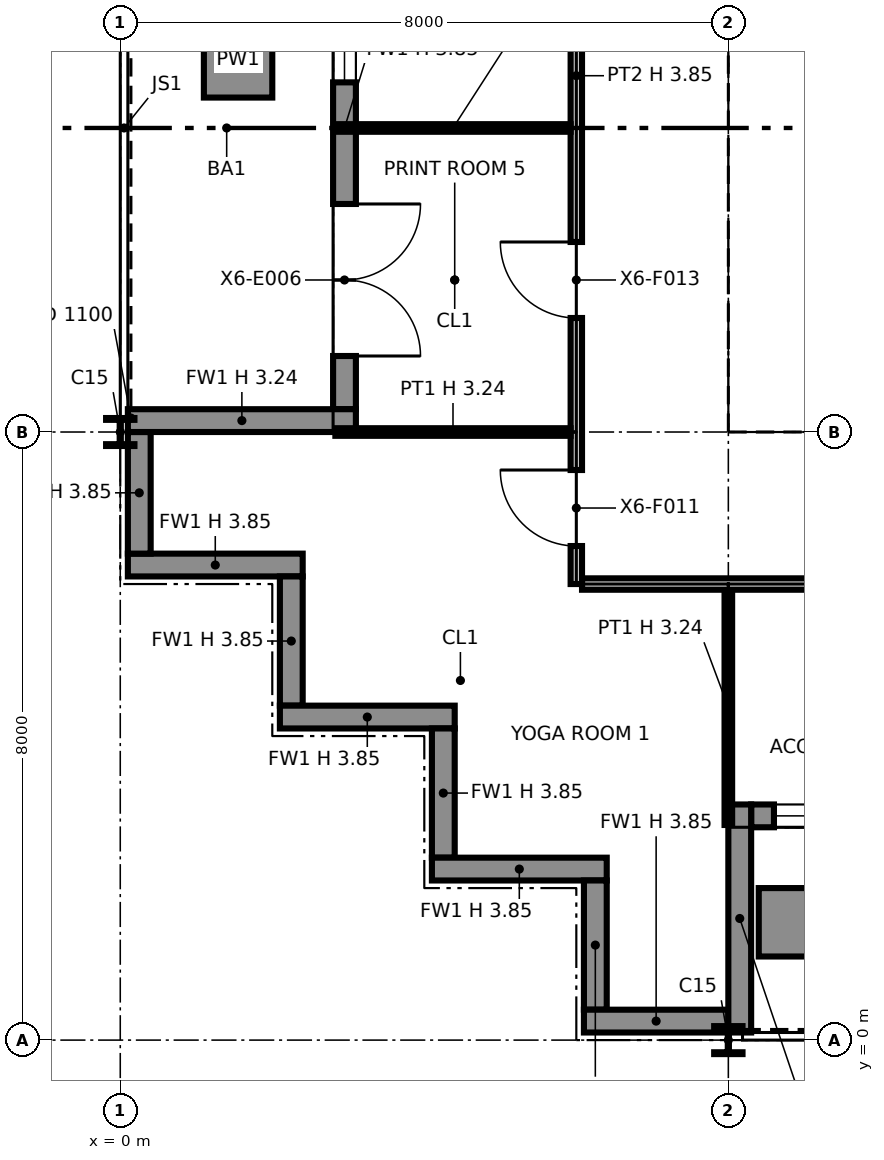
"""IFC4 building model, lengths in metres.
Left out: names, types, materials, properties, quantities, classifications, styles, units other than length and angle.
Written with IfcOpenShell. Run it as: python <this file> out.ifc"""

import sys

from ifc_helpers import new_model, si_unit, direction, frame, frame_2d, origin, origin_2d, place, context, subcontext, project, spatial, polyline, rectangle, i_section, outline, extrude, element, fill, save


model = new_model("IFC4")
c1 = context("Model", 3, precision=1e-05, world=origin(), true_north=direction((0.0, 1.0)))
c2 = subcontext(c1, "Body", "Model", "MODEL_VIEW")
j1 = project(units=[si_unit("LENGTHUNIT", "METRE"), si_unit("PLANEANGLEUNIT", "RADIAN")], contexts=[c1])
p1 = place(None, origin())
s1 = spatial("IfcSite", under=j1, at=p1, CompositionType="ELEMENT")
p2 = place(p1, origin())
s2 = spatial("IfcBuilding", under=s1, at=p2, CompositionType="ELEMENT")
p3 = place(p2, frame((0.0, 0.0, 291.0)))
s3 = spatial("IfcBuildingStorey", under=s2, at=p3, CompositionType="ELEMENT", Elevation=291.0)
for number, where, z_axis, x_axis in (
    (1, (0.0, 8.0, 0.0), (0.0, 0.0, 1.0), (1.0, 0.0, 0.0)),
    (2, (8.0, 0.0, 0.0), (0.0, 0.0, 1.0), (1.0, 0.0, 0.0)),
):
    element("IfcColumn", number, at=place(p3, frame(where, z_axis=z_axis, x_axis=x_axis)), inside=s3, PredefinedType="COLUMN", context=c2, shape_type="SweptSolid", body=[
        extrude(i_section(OverallWidth=0.373, OverallDepth=0.368, WebThickness=0.015, FlangeThickness=0.024, at=origin_2d()), origin(), (0.0, 0.0, 1.0), 3.85),
    ])
p4 = place(p3, frame((8.0, 8.0, 0.0), z_axis=(0.0, 0.0, 1.0), x_axis=(1.0, 0.0, 0.0)))
e3 = element("IfcColumn", 3, at=p4, inside=s3, PredefinedType="COLUMN", context=c2, shape_type="SweptSolid", body=[
    extrude(i_section(OverallWidth=0.257, OverallDepth=0.363, WebThickness=0.013, FlangeThickness=0.022, at=origin_2d()), origin(), (0.0, 0.0, 1.0), 3.85),
])
p5 = place(p3, frame((0.1, 6.25, 0.0), z_axis=(0.0, 0.0, 1.0), x_axis=(1.0, 0.0, 0.0)))
e4 = element("IfcWall", 4, at=p5, inside=s3, PredefinedType="SOLIDWALL", context=c2, shape_type="SweptSolid", body=[
    extrude(rectangle(XDim=2.3, YDim=0.3, at=frame_2d((1.15, 0.0))), origin(), (0.0, 0.0, 1.0), 3.85),
])
p6 = place(p3, frame((2.25, 6.1, 0.0), z_axis=(0.0, 0.0, 1.0), x_axis=(0.0, -1.0, 0.0)))
e5 = element("IfcWall", 5, at=p6, inside=s3, PredefinedType="SOLIDWALL", context=c2, shape_type="SweptSolid", body=[
    extrude(rectangle(XDim=1.7, YDim=0.3, at=frame_2d((0.85, 0.0))), origin(), (0.0, 0.0, 1.0), 3.85),
])
p7 = place(p3, frame((2.1, 4.25, 0.0), z_axis=(0.0, 0.0, 1.0), x_axis=(1.0, 0.0, 0.0)))
e6 = element("IfcWall", 6, at=p7, inside=s3, PredefinedType="SOLIDWALL", context=c2, shape_type="SweptSolid", body=[
    extrude(rectangle(XDim=2.3, YDim=0.3, at=frame_2d((1.15, 0.0))), origin(), (0.0, 0.0, 1.0), 3.85),
])
p8 = place(p3, frame((4.25, 4.1, 0.0), z_axis=(0.0, 0.0, 1.0), x_axis=(0.0, -1.0, 0.0)))
e7 = element("IfcWall", 7, at=p8, inside=s3, PredefinedType="SOLIDWALL", context=c2, shape_type="SweptSolid", body=[
    extrude(rectangle(XDim=1.7, YDim=0.3, at=frame_2d((0.85, 0.0))), origin(), (0.0, 0.0, 1.0), 3.85),
])
p9 = place(p3, frame((4.1, 2.25, 0.0), z_axis=(0.0, 0.0, 1.0), x_axis=(1.0, 0.0, 0.0)))
e8 = element("IfcWall", 8, at=p9, inside=s3, PredefinedType="SOLIDWALL", context=c2, shape_type="SweptSolid", body=[
    extrude(rectangle(XDim=2.3, YDim=0.3, at=frame_2d((1.15, 0.0))), origin(), (0.0, 0.0, 1.0), 3.85),
])
p10 = place(p3, frame((6.25, 2.1, 0.0), z_axis=(0.0, 0.0, 1.0), x_axis=(0.0, -1.0, 0.0)))
e9 = element("IfcWall", 9, at=p10, inside=s3, PredefinedType="SOLIDWALL", context=c2, shape_type="SweptSolid", body=[
    extrude(rectangle(XDim=1.7, YDim=0.3, at=frame_2d((0.85, 0.0))), origin(), (0.0, 0.0, 1.0), 3.85),
])
p11 = place(p3, frame((6.1, 0.25, 0.0), z_axis=(0.0, 0.0, 1.0), x_axis=(1.0, 0.0, 0.0)))
e10 = element("IfcWall", 10, at=p11, inside=s3, PredefinedType="SOLIDWALL", context=c2, shape_type="SweptSolid", body=[
    extrude(rectangle(XDim=1.9, YDim=0.3, at=frame_2d((0.95, 0.0))), origin(), (0.0, 0.0, 1.0), 3.85),
])
p12 = place(p3, frame((8.3, 2.95, 0.0), z_axis=(0.0, 0.0, 1.0), x_axis=(1.0, 0.0, 0.0)))
e11 = element("IfcWall", 11, at=p12, inside=s3, PredefinedType="SOLIDWALL", context=c2, shape_type="SweptSolid", body=[
    extrude(rectangle(XDim=7.4, YDim=0.3, at=frame_2d((3.7, 0.0))), origin(), (0.0, 0.0, 1.0), 3.85),
])
p13 = place(p12, frame((0.3, 0.0, 0.9)))
e12 = element("IfcOpeningElement", 12, at=p13, cuts=e11, PredefinedType="OPENING", context=c2, shape_type="SweptSolid", body=[
    extrude(rectangle(XDim=2.8, YDim=2.2, at=frame_2d((1.4, 1.1))), frame((0.0, 0.16, 0.0), z_axis=(0.0, -1.0, 0.0), x_axis=(1.0, 0.0, 0.0)), (0.0, 0.0, 1.0), 0.32),
])
p14 = place(p12, frame((4.7, 0.0, 0.0)))
e13 = element("IfcOpeningElement", 13, at=p14, cuts=e11, PredefinedType="OPENING", context=c2, shape_type="SweptSolid", body=[
    extrude(rectangle(XDim=2.0, YDim=2.4, at=frame_2d((1.0, 1.2))), frame((0.0, 0.16, 0.0), z_axis=(0.0, -1.0, 0.0), x_axis=(1.0, 0.0, 0.0)), (0.0, 0.0, 1.0), 0.32),
])
p15 = place(p3, frame((8.15, 0.1, 0.0), z_axis=(0.0, 0.0, 1.0), x_axis=(0.0, 1.0, 0.0)))
e14 = element("IfcWall", 14, at=p15, inside=s3, PredefinedType="SOLIDWALL", context=c2, shape_type="SweptSolid", body=[
    extrude(rectangle(XDim=3.0, YDim=0.3, at=frame_2d((1.5, 0.0))), origin(), (0.0, 0.0, 1.0), 3.237),
])
p16 = place(p3, frame((8.4, 1.55, 0.0), z_axis=(0.0, 0.0, 1.0), x_axis=(1.0, 0.0, 0.0)))
e15 = element("IfcWall", 15, at=p16, inside=s3, PredefinedType="SOLIDWALL", context=c2, shape_type="SweptSolid", body=[
    extrude(rectangle(XDim=3.2, YDim=0.9, at=frame_2d((1.6, 0.0))), origin(), (0.0, 0.0, 1.0), 0.6),
])
p17 = place(p3, frame((2.95, 15.7, 0.0), z_axis=(0.0, 0.0, 1.0), x_axis=(0.0, -1.0, 0.0)))
e16 = element("IfcWall", 16, at=p17, inside=s3, PredefinedType="SOLIDWALL", context=c2, shape_type="SweptSolid", body=[
    extrude(rectangle(XDim=7.4, YDim=0.3, at=frame_2d((3.7, 0.0))), origin(), (0.0, 0.0, 1.0), 3.85),
])
p18 = place(p17, frame((0.3, 0.0, 0.9)))
e17 = element("IfcOpeningElement", 17, at=p18, cuts=e16, PredefinedType="OPENING", context=c2, shape_type="SweptSolid", body=[
    extrude(rectangle(XDim=2.8, YDim=2.2, at=frame_2d((1.4, 1.1))), frame((0.0, 0.16, 0.0), z_axis=(0.0, -1.0, 0.0), x_axis=(1.0, 0.0, 0.0)), (0.0, 0.0, 1.0), 0.32),
])
p19 = place(p17, frame((4.7, 0.0, 0.0)))
e18 = element("IfcOpeningElement", 18, at=p19, cuts=e16, PredefinedType="OPENING", context=c2, shape_type="SweptSolid", body=[
    extrude(rectangle(XDim=2.0, YDim=2.4, at=frame_2d((1.0, 1.2))), frame((0.0, 0.16, 0.0), z_axis=(0.0, -1.0, 0.0), x_axis=(1.0, 0.0, 0.0)), (0.0, 0.0, 1.0), 0.32),
])
p20 = place(p3, frame((0.1, 8.15, 0.0), z_axis=(0.0, 0.0, 1.0), x_axis=(1.0, 0.0, 0.0)))
e19 = element("IfcWall", 19, at=p20, inside=s3, PredefinedType="SOLIDWALL", context=c2, shape_type="SweptSolid", body=[
    extrude(rectangle(XDim=3.0, YDim=0.3, at=frame_2d((1.5, 0.0))), origin(), (0.0, 0.0, 1.0), 3.237),
])
p21 = place(p3, frame((0.25, 8.0, 0.0), z_axis=(0.0, 0.0, 1.0), x_axis=(0.0, -1.0, 0.0)))
e20 = element("IfcWall", 20, at=p21, inside=s3, PredefinedType="SOLIDWALL", context=c2, shape_type="SweptSolid", body=[
    extrude(rectangle(XDim=1.6, YDim=0.3, at=frame_2d((0.8, 0.0))), origin(), (0.0, 0.0, 1.0), 3.85),
])
p22 = place(p3, frame((1.55, 15.6, 0.0), z_axis=(0.0, 0.0, 1.0), x_axis=(0.0, -1.0, 0.0)))
e21 = element("IfcWall", 21, at=p22, inside=s3, PredefinedType="SOLIDWALL", context=c2, shape_type="SweptSolid", body=[
    extrude(rectangle(XDim=3.2, YDim=0.9, at=frame_2d((1.6, 0.0))), origin(), (0.0, 0.0, 1.0), 0.6),
])
p23 = place(p3, frame((8.65, 8.75, 0.0), z_axis=(0.0, 0.0, 1.0), x_axis=(1.0, 0.0, 0.0)))
e22 = element("IfcWall", 22, at=p23, inside=s3, PredefinedType="PARTITIONING", context=c2, shape_type="SweptSolid", body=[
    extrude(outline(polyline([(0.0, 0.0), (14.7, 0.0), (14.7, 3.85), (7.438, 3.85), (7.437, 3.318), (7.263, 3.318), (7.262, 3.85), (0.0, 3.85), (0.0, 0.0)])), frame((0.0, 0.1, 0.0), z_axis=(0.0, -1.0, 0.0), x_axis=(1.0, 0.0, 0.0)), (0.0, 0.0, 1.0), 0.2),
])
p24 = place(p23, frame((1.3, 0.0, 0.0)))
e23 = element("IfcOpeningElement", 23, at=p24, cuts=e22, PredefinedType="OPENING", context=c2, shape_type="SweptSolid", body=[
    extrude(rectangle(XDim=1.4, YDim=2.1, at=frame_2d((0.7, 1.05))), frame((0.0, 0.11, 0.0), z_axis=(0.0, -1.0, 0.0), x_axis=(1.0, 0.0, 0.0)), (0.0, 0.0, 1.0), 0.22),
])
p25 = place(p23, frame((4.6, 0.0, 0.0)))
e24 = element("IfcOpeningElement", 24, at=p25, cuts=e22, PredefinedType="OPENING", context=c2, shape_type="SweptSolid", body=[
    extrude(rectangle(XDim=1.4, YDim=2.1, at=frame_2d((0.7, 1.05))), frame((0.0, 0.11, 0.0), z_axis=(0.0, -1.0, 0.0), x_axis=(1.0, 0.0, 0.0)), (0.0, 0.0, 1.0), 0.22),
])
p26 = place(p23, frame((10.4, 0.0, 0.0)))
e25 = element("IfcOpeningElement", 25, at=p26, cuts=e22, PredefinedType="OPENING", context=c2, shape_type="SweptSolid", body=[
    extrude(rectangle(XDim=1.2, YDim=2.1, at=frame_2d((0.6, 1.05))), frame((0.0, 0.11, 0.0), z_axis=(0.0, -1.0, 0.0), x_axis=(1.0, 0.0, 0.0)), (0.0, 0.0, 1.0), 0.22),
])
p27 = place(p3, frame((8.75, 8.85, 0.0), z_axis=(0.0, 0.0, 1.0), x_axis=(0.0, 1.0, 0.0)))
e26 = element("IfcWall", 26, at=p27, inside=s3, PredefinedType="PARTITIONING", context=c2, shape_type="SweptSolid", body=[
    extrude(outline(polyline([(0.0, 0.0), (14.3, 0.0), (14.3, 3.85), (10.225, 3.85), (10.224, 3.44), (10.076, 3.44), (10.075, 3.85), (7.238, 3.85), (7.237, 3.318), (7.063, 3.318), (7.062, 3.85), (0.0, 3.85), (0.0, 0.0)])), frame((0.0, 0.1, 0.0), z_axis=(0.0, -1.0, 0.0), x_axis=(1.0, 0.0, 0.0)), (0.0, 0.0, 1.0), 0.2),
])
p28 = place(p27, frame((8.3, 0.0, 0.0)))
e27 = element("IfcOpeningElement", 27, at=p28, cuts=e26, PredefinedType="OPENING", context=c2, shape_type="SweptSolid", body=[
    extrude(rectangle(XDim=1.8, YDim=2.1, at=frame_2d((0.9, 1.05))), frame((0.0, 0.11, 0.0), z_axis=(0.0, -1.0, 0.0), x_axis=(1.0, 0.0, 0.0)), (0.0, 0.0, 1.0), 0.22),
])
p29 = place(p3, frame((8.0, 2.83, 0.0), z_axis=(0.0, 0.0, 1.0), x_axis=(0.0, 1.0, 0.0)))
e28 = element("IfcWall", 28, at=p29, inside=s3, PredefinedType="PARTITIONING", context=c2, shape_type="SweptSolid", body=[
    extrude(rectangle(XDim=3.095, YDim=0.1, at=frame_2d((1.547, 0.0))), origin(), (0.0, 0.0, 1.0), 3.238),
])
p30 = place(p3, frame((6.075, 6.0, 0.0), z_axis=(0.0, 0.0, 1.0), x_axis=(1.0, 0.0, 0.0)))
e29 = element("IfcWall", 29, at=p30, inside=s3, PredefinedType="PARTITIONING", context=c2, shape_type="SweptSolid", body=[
    extrude(rectangle(XDim=35.85, YDim=0.15, at=frame_2d((17.925, 0.0))), origin(), (0.0, 0.0, 1.0), 3.85),
])
p31 = place(p30, frame((12.425, 0.0, 0.0), z_axis=(0.0, 0.0, 1.0), x_axis=(-1.0, 0.0, 0.0)))
e30 = element("IfcOpeningElement", 30, at=p31, cuts=e29, PredefinedType="OPENING", context=c2, shape_type="SweptSolid", body=[
    extrude(rectangle(XDim=1.0, YDim=2.1, at=frame_2d((0.5, 1.05))), frame((0.0, 0.085, 0.0), z_axis=(0.0, -1.0, 0.0), x_axis=(1.0, 0.0, 0.0)), (0.0, 0.0, 1.0), 0.17),
])
p32 = place(p30, frame((16.425, 0.0, 0.0), z_axis=(0.0, 0.0, 1.0), x_axis=(-1.0, 0.0, 0.0)))
e31 = element("IfcOpeningElement", 31, at=p32, cuts=e29, PredefinedType="OPENING", context=c2, shape_type="SweptSolid", body=[
    extrude(rectangle(XDim=1.0, YDim=2.1, at=frame_2d((0.5, 1.05))), frame((0.0, 0.085, 0.0), z_axis=(0.0, -1.0, 0.0), x_axis=(1.0, 0.0, 0.0)), (0.0, 0.0, 1.0), 0.17),
])
p33 = place(p30, frame((30.425, 0.0, 0.0), z_axis=(0.0, 0.0, 1.0), x_axis=(-1.0, 0.0, 0.0)))
e32 = element("IfcOpeningElement", 32, at=p33, cuts=e29, PredefinedType="OPENING", context=c2, shape_type="SweptSolid", body=[
    extrude(rectangle(XDim=1.0, YDim=2.1, at=frame_2d((0.5, 1.05))), frame((0.0, 0.085, 0.0), z_axis=(0.0, -1.0, 0.0), x_axis=(1.0, 0.0, 0.0)), (0.0, 0.0, 1.0), 0.17),
])
p34 = place(p30, frame((4.425, 0.0, 0.0), z_axis=(0.0, 0.0, 1.0), x_axis=(-1.0, 0.0, 0.0)))
e33 = element("IfcOpeningElement", 33, at=p34, cuts=e29, PredefinedType="OPENING", context=c2, shape_type="SweptSolid", body=[
    extrude(rectangle(XDim=1.0, YDim=2.1, at=frame_2d((0.5, 1.05))), frame((0.0, 0.085, 0.0), z_axis=(0.0, -1.0, 0.0), x_axis=(1.0, 0.0, 0.0)), (0.0, 0.0, 1.0), 0.17),
])
p35 = place(p30, frame((8.425, 0.0, 0.0), z_axis=(0.0, 0.0, 1.0), x_axis=(-1.0, 0.0, 0.0)))
e34 = element("IfcOpeningElement", 34, at=p35, cuts=e29, PredefinedType="OPENING", context=c2, shape_type="SweptSolid", body=[
    extrude(rectangle(XDim=1.0, YDim=2.1, at=frame_2d((0.5, 1.05))), frame((0.0, 0.085, 0.0), z_axis=(0.0, -1.0, 0.0), x_axis=(1.0, 0.0, 0.0)), (0.0, 0.0, 1.0), 0.17),
])
p36 = place(p30, frame((19.425, 0.0, 0.0), z_axis=(0.0, 0.0, 1.0), x_axis=(-1.0, 0.0, 0.0)))
e35 = element("IfcOpeningElement", 35, at=p36, cuts=e29, PredefinedType="OPENING", context=c2, shape_type="SweptSolid", body=[
    extrude(rectangle(XDim=1.0, YDim=2.1, at=frame_2d((0.5, 1.05))), frame((0.0, 0.085, 0.0), z_axis=(0.0, -1.0, 0.0), x_axis=(1.0, 0.0, 0.0)), (0.0, 0.0, 1.0), 0.17),
])
p37 = place(p30, frame((24.425, 0.0, 0.0), z_axis=(0.0, 0.0, 1.0), x_axis=(-1.0, 0.0, 0.0)))
e36 = element("IfcOpeningElement", 36, at=p37, cuts=e29, PredefinedType="OPENING", context=c2, shape_type="SweptSolid", body=[
    extrude(rectangle(XDim=1.0, YDim=2.1, at=frame_2d((0.5, 1.05))), frame((0.0, 0.085, 0.0), z_axis=(0.0, -1.0, 0.0), x_axis=(1.0, 0.0, 0.0)), (0.0, 0.0, 1.0), 0.17),
])
p38 = place(p30, frame((35.425, 0.0, 0.0), z_axis=(0.0, 0.0, 1.0), x_axis=(-1.0, 0.0, 0.0)))
e37 = element("IfcOpeningElement", 37, at=p38, cuts=e29, PredefinedType="OPENING", context=c2, shape_type="SweptSolid", body=[
    extrude(rectangle(XDim=1.0, YDim=2.1, at=frame_2d((0.5, 1.05))), frame((0.0, 0.085, 0.0), z_axis=(0.0, -1.0, 0.0), x_axis=(1.0, 0.0, 0.0)), (0.0, 0.0, 1.0), 0.17),
])
p39 = place(p3, frame((6.0, 6.0, 0.0), z_axis=(0.0, 0.0, 1.0), x_axis=(0.0, 1.0, 0.0)))
e38 = element("IfcWall", 38, at=p39, inside=s3, PredefinedType="PARTITIONING", context=c2, shape_type="SweptSolid", body=[
    extrude(outline(polyline([(0.0, 0.0), (13.375, 0.0), (13.375, 3.85), (10.3, 3.85), (10.298, 3.238), (9.702, 3.238), (9.7, 3.85), (6.3, 3.85), (6.298, 3.238), (5.702, 3.238), (5.7, 3.85), (2.3, 3.85), (2.298, 3.238), (1.702, 3.238), (1.7, 3.85), (0.0, 3.85), (0.0, 0.0)])), frame((0.0, 0.075, 0.0), z_axis=(0.0, -1.0, 0.0), x_axis=(1.0, 0.0, 0.0)), (0.0, 0.0, 1.0), 0.15),
])
p40 = place(p39, frame((0.5, 0.0, 0.0)))
e39 = element("IfcOpeningElement", 39, at=p40, cuts=e38, PredefinedType="OPENING", context=c2, shape_type="SweptSolid", body=[
    extrude(rectangle(XDim=1.0, YDim=2.1, at=frame_2d((0.5, 1.05))), frame((0.0, 0.085, 0.0), z_axis=(0.0, -1.0, 0.0), x_axis=(1.0, 0.0, 0.0)), (0.0, 0.0, 1.0), 0.17),
])
p41 = place(p39, frame((3.5, 0.0, 0.0)))
e40 = element("IfcOpeningElement", 40, at=p41, cuts=e38, PredefinedType="OPENING", context=c2, shape_type="SweptSolid", body=[
    extrude(rectangle(XDim=1.0, YDim=2.1, at=frame_2d((0.5, 1.05))), frame((0.0, 0.085, 0.0), z_axis=(0.0, -1.0, 0.0), x_axis=(1.0, 0.0, 0.0)), (0.0, 0.0, 1.0), 0.17),
])
p42 = place(p39, frame((7.5, 0.0, 0.0)))
e41 = element("IfcOpeningElement", 41, at=p42, cuts=e38, PredefinedType="OPENING", context=c2, shape_type="SweptSolid", body=[
    extrude(rectangle(XDim=1.0, YDim=2.1, at=frame_2d((0.5, 1.05))), frame((0.0, 0.085, 0.0), z_axis=(0.0, -1.0, 0.0), x_axis=(1.0, 0.0, 0.0)), (0.0, 0.0, 1.0), 0.17),
])
p43 = place(p39, frame((11.225, 0.0, 0.0)))
e42 = element("IfcOpeningElement", 42, at=p43, cuts=e38, PredefinedType="OPENING", context=c2, shape_type="SweptSolid", body=[
    extrude(rectangle(XDim=1.0, YDim=2.1, at=frame_2d((0.5, 1.05))), frame((0.0, 0.085, 0.0), z_axis=(0.0, -1.0, 0.0), x_axis=(1.0, 0.0, 0.0)), (0.0, 0.0, 1.0), 0.17),
])
for number, where, z_axis, x_axis in (
    (43, (2.83, 8.0, 0.0), (0.0, 0.0, 1.0), (1.0, 0.0, 0.0)),
    (44, (2.83, 12.0, 0.0), (0.0, 0.0, 1.0), (1.0, 0.0, 0.0)),
):
    element("IfcWall", number, at=place(p3, frame(where, z_axis=z_axis, x_axis=x_axis)), inside=s3, PredefinedType="PARTITIONING", context=c2, shape_type="SweptSolid", body=[
        extrude(rectangle(XDim=3.095, YDim=0.1, at=frame_2d((1.547, 0.0))), origin(), (0.0, 0.0, 1.0), 3.238),
    ])
p44 = place(p13, origin())
e45 = element("IfcWindow", 45, at=p44, inside=s3, PartitioningType="SINGLE_PANEL", PredefinedType="WINDOW", context=c2, shape_type="SweptSolid", body=[
    extrude(rectangle(XDim=2.8, YDim=2.2, at=frame_2d((1.4, 1.1))), frame((0.0, 0.03, 0.0), z_axis=(0.0, -1.0, 0.0), x_axis=(1.0, 0.0, 0.0)), (0.0, 0.0, 1.0), 0.06),
])
fill(e12, e45)
p45 = place(p18, origin())
e46 = element("IfcWindow", 46, at=p45, inside=s3, PartitioningType="SINGLE_PANEL", PredefinedType="WINDOW", context=c2, shape_type="SweptSolid", body=[
    extrude(rectangle(XDim=2.8, YDim=2.2, at=frame_2d((1.4, 1.1))), frame((0.0, 0.03, 0.0), z_axis=(0.0, -1.0, 0.0), x_axis=(1.0, 0.0, 0.0)), (0.0, 0.0, 1.0), 0.06),
])
fill(e17, e46)
p46 = place(p19, origin())
e47 = element("IfcDoor", 47, at=p46, inside=s3, OperationType="DOUBLE_DOOR_SINGLE_SWING", PredefinedType="DOOR", context=c2, shape_type="SweptSolid", body=[
    extrude(rectangle(XDim=2.0, YDim=2.4, at=frame_2d((1.0, 1.2))), frame((0.0, 0.025, 0.0), z_axis=(0.0, -1.0, 0.0), x_axis=(1.0, 0.0, 0.0)), (0.0, 0.0, 1.0), 0.05),
])
fill(e18, e47)
p47 = place(p40, origin())
e48 = element("IfcDoor", 48, at=p47, inside=s3, OperationType="SINGLE_SWING_RIGHT", PredefinedType="DOOR", context=c2, shape_type="SweptSolid", body=[
    extrude(rectangle(XDim=1.0, YDim=2.1, at=frame_2d((0.5, 1.05))), frame((0.0, 0.025, 0.0), z_axis=(0.0, -1.0, 0.0), x_axis=(1.0, 0.0, 0.0)), (0.0, 0.0, 1.0), 0.05),
])
fill(e39, e48)
p48 = place(p41, origin())
e49 = element("IfcDoor", 49, at=p48, inside=s3, OperationType="SINGLE_SWING_RIGHT", PredefinedType="DOOR", context=c2, shape_type="SweptSolid", body=[
    extrude(rectangle(XDim=1.0, YDim=2.1, at=frame_2d((0.5, 1.05))), frame((0.0, 0.025, 0.0), z_axis=(0.0, -1.0, 0.0), x_axis=(1.0, 0.0, 0.0)), (0.0, 0.0, 1.0), 0.05),
])
fill(e40, e49)
save(model, sys.argv[1])
